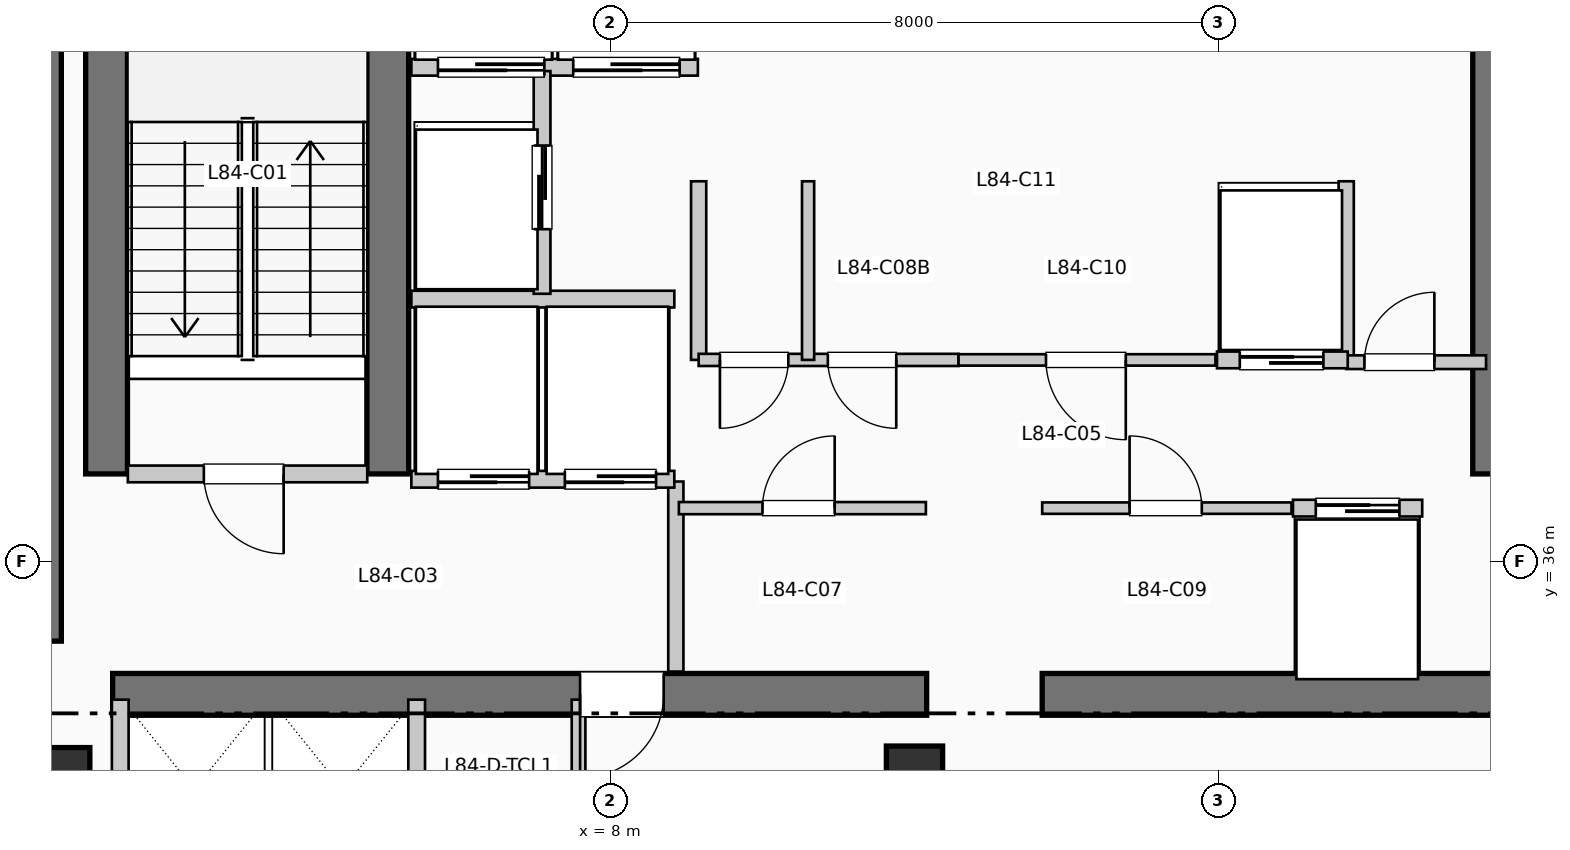
"""IFC4 building model, lengths in metres.
Left out: names, types, materials, properties, quantities, classifications, styles, units other than length and angle.
Written with IfcOpenShell. Run it as: python <this file> out.ifc"""

import sys

from ifc_helpers import new_model, si_unit, direction, frame, frame_2d, origin, origin_2d, place, context, subcontext, project, spatial, rectangle, extrude, element, fill, save


model = new_model("IFC4")
c1 = context("Model", 3, precision=1e-05, world=origin(), true_north=direction((0.0, 1.0)))
c2 = subcontext(c1, "Body", "Model", "MODEL_VIEW")
j1 = project(units=[si_unit("LENGTHUNIT", "METRE"), si_unit("PLANEANGLEUNIT", "RADIAN")], contexts=[c1])
p1 = place(None, origin())
s1 = spatial("IfcSite", under=j1, at=p1, CompositionType="ELEMENT")
p2 = place(p1, origin())
s2 = spatial("IfcBuilding", under=s1, at=p2, CompositionType="ELEMENT")
p3 = place(p2, frame((0.0, 0.0, 343.53)))
s3 = spatial("IfcBuildingStorey", under=s2, at=p3, CompositionType="ELEMENT", Elevation=343.53)
p4 = place(p3, frame((0.5, 34.95, 0.0), z_axis=(0.0, 0.0, 1.0), x_axis=(0.0, 1.0, 0.0)))
e1 = element("IfcWall", 1, at=p4, inside=s3, PredefinedType="SHEAR", context=c2, shape_type="SweptSolid", body=[
    extrude(rectangle(XDim=7.9, YDim=0.55, at=frame_2d((3.95, 0.0))), origin(), (0.0, 0.0, 1.0), 3.96),
])
p5 = place(p3, frame((1.45, 34.25, 0.0), z_axis=(0.0, 0.0, 1.0), x_axis=(1.0, 0.0, 0.0)))
e2 = element("IfcWall", 2, at=p5, inside=s3, PredefinedType="SHEAR", context=c2, shape_type="SweptSolid", body=[
    extrude(rectangle(XDim=10.71, YDim=0.55, at=frame_2d((5.355, 0.0))), origin(), (0.0, 0.0, 1.0), 3.96),
])
p6 = place(p5, frame((7.25, 0.0, 0.0), z_axis=(0.0, 0.0, 1.0), x_axis=(-1.0, 0.0, 0.0)))
e3 = element("IfcOpeningElement", 3, at=p6, cuts=e2, PredefinedType="OPENING", context=c2, shape_type="SweptSolid", body=[
    extrude(rectangle(XDim=1.1, YDim=2.15, at=frame_2d((0.55, 1.075))), frame((0.0, 0.285, 0.0), z_axis=(0.0, -1.0, 0.0), x_axis=(1.0, 0.0, 0.0)), (0.0, 0.0, 1.0), 0.57),
])
p7 = place(p3, frame((13.68, 34.25, 0.0), z_axis=(0.0, 0.0, 1.0), x_axis=(1.0, 0.0, 0.0)))
e4 = element("IfcWall", 4, at=p7, inside=s3, PredefinedType="SHEAR", context=c2, shape_type="SweptSolid", body=[
    extrude(rectangle(XDim=6.12, YDim=0.55, at=frame_2d((3.06, 0.0))), origin(), (0.0, 0.0, 1.0), 3.96),
])
for number, where, z_axis, x_axis in (
    (5, (1.37, 37.15, 0.0), (0.0, 0.0, 1.0), (0.0, 1.0, 0.0)),
    (6, (5.07, 37.15, 0.0), (0.0, 0.0, 1.0), (0.0, 1.0, 0.0)),
    (7, (19.62, 37.15, 0.0), (0.0, 0.0, 1.0), (0.0, 1.0, 0.0)),
):
    element("IfcWall", number, at=place(p3, frame(where, z_axis=z_axis, x_axis=x_axis)), inside=s3, PredefinedType="SHEAR", context=c2, shape_type="SweptSolid", body=[
        extrude(rectangle(XDim=7.89, YDim=0.55, at=frame_2d((3.945, 0.0))), origin(), (0.0, 0.0, 1.0), 3.96),
    ])
p8 = place(p3, frame((0.8, 33.2, 0.0), z_axis=(0.0, 0.0, 1.0), x_axis=(1.0, 0.0, 0.0)))
e8 = element("IfcColumn", 8, at=p8, inside=s3, PredefinedType="COLUMN", context=c2, shape_type="SweptSolid", body=[
    extrude(rectangle(XDim=0.7, YDim=0.7, at=origin_2d()), origin(), (0.0, 0.0, 1.0), 3.96),
])
p9 = place(p3, frame((12.0, 33.2, 0.0), z_axis=(0.0, 0.0, 1.0), x_axis=(1.0, 0.0, 0.0)))
e9 = element("IfcColumn", 9, at=p9, inside=s3, PredefinedType="COLUMN", context=c2, shape_type="SweptSolid", body=[
    extrude(rectangle(XDim=0.74, YDim=0.74, at=origin_2d()), origin(), (0.0, 0.0, 1.0), 3.96),
])
p10 = place(p3, frame((1.65, 37.15, 0.0), z_axis=(0.0, 0.0, 1.0), x_axis=(1.0, 0.0, 0.0)))
e10 = element("IfcWall", 10, at=p10, inside=s3, PredefinedType="PARTITIONING", context=c2, shape_type="SweptSolid", body=[
    extrude(rectangle(XDim=3.15, YDim=0.22, at=frame_2d((1.575, 0.0))), origin(), (0.0, 0.0, 1.0), 3.71),
])
p11 = place(p10, frame((2.05, 0.0, 0.0), z_axis=(0.0, 0.0, 1.0), x_axis=(-1.0, 0.0, 0.0)))
e11 = element("IfcOpeningElement", 11, at=p11, cuts=e10, PredefinedType="OPENING", context=c2, shape_type="SweptSolid", body=[
    extrude(rectangle(XDim=1.05, YDim=2.15, at=frame_2d((0.525, 1.075))), frame((0.0, 0.12, 0.0), z_axis=(0.0, -1.0, 0.0), x_axis=(1.0, 0.0, 0.0)), (0.0, 0.0, 1.0), 0.24),
])
p12 = place(p3, frame((8.86, 34.55, 0.0), z_axis=(0.0, 0.0, 1.0), x_axis=(0.0, 1.0, 0.0)))
e12 = element("IfcWall", 12, at=p12, inside=s3, PredefinedType="PARTITIONING", context=c2, shape_type="SweptSolid", body=[
    extrude(rectangle(XDim=2.5, YDim=0.2, at=frame_2d((1.25, 0.0))), origin(), (0.0, 0.0, 1.0), 3.71),
])
p13 = place(p3, frame((5.38, 37.08, 0.0), z_axis=(0.0, 0.0, 1.0), x_axis=(1.0, 0.0, 0.0)))
e13 = element("IfcWall", 13, at=p13, inside=s3, PredefinedType="PARTITIONING", context=c2, shape_type="SweptSolid", body=[
    extrude(rectangle(XDim=3.46, YDim=0.22, at=frame_2d((1.73, 0.0))), origin(), (0.0, 0.0, 1.0), 3.71),
])
p14 = place(p13, frame((1.55, 0.0, 0.0), z_axis=(0.0, 0.0, 1.0), x_axis=(-1.0, 0.0, 0.0)))
e14 = element("IfcOpeningElement", 14, at=p14, cuts=e13, PredefinedType="OPENING", context=c2, shape_type="SweptSolid", body=[
    extrude(rectangle(XDim=1.2, YDim=2.2, at=frame_2d((0.6, 1.1))), frame((0.0, 0.12, 0.0), z_axis=(0.0, -1.0, 0.0), x_axis=(1.0, 0.0, 0.0)), (0.0, 0.0, 1.0), 0.24),
])
p15 = place(p13, frame((3.22, 0.0, 0.0), z_axis=(0.0, 0.0, 1.0), x_axis=(-1.0, 0.0, 0.0)))
e15 = element("IfcOpeningElement", 15, at=p15, cuts=e13, PredefinedType="OPENING", context=c2, shape_type="SweptSolid", body=[
    extrude(rectangle(XDim=1.2, YDim=2.2, at=frame_2d((0.6, 1.1))), frame((0.0, 0.12, 0.0), z_axis=(0.0, -1.0, 0.0), x_axis=(1.0, 0.0, 0.0)), (0.0, 0.0, 1.0), 0.24),
])
p16 = place(p3, frame((5.38, 39.45, 0.0), z_axis=(0.0, 0.0, 1.0), x_axis=(1.0, 0.0, 0.0)))
e16 = element("IfcWall", 16, at=p16, inside=s3, PredefinedType="PARTITIONING", context=c2, shape_type="SweptSolid", body=[
    extrude(rectangle(XDim=3.46, YDim=0.22, at=frame_2d((1.73, 0.0))), origin(), (0.0, 0.0, 1.0), 3.71),
])
p17 = place(p3, frame((5.38, 42.5, 0.0), z_axis=(0.0, 0.0, 1.0), x_axis=(1.0, 0.0, 0.0)))
e17 = element("IfcWall", 17, at=p17, inside=s3, PredefinedType="PARTITIONING", context=c2, shape_type="SweptSolid", body=[
    extrude(rectangle(XDim=3.77, YDim=0.22, at=frame_2d((1.885, 0.0))), origin(), (0.0, 0.0, 1.0), 3.71),
])
p18 = place(p17, frame((1.75, 0.0, 0.0), z_axis=(0.0, 0.0, 1.0), x_axis=(-1.0, 0.0, 0.0)))
e18 = element("IfcOpeningElement", 18, at=p18, cuts=e17, PredefinedType="OPENING", context=c2, shape_type="SweptSolid", body=[
    extrude(rectangle(XDim=1.4, YDim=2.2, at=frame_2d((0.7, 1.1))), frame((0.0, 0.12, 0.0), z_axis=(0.0, -1.0, 0.0), x_axis=(1.0, 0.0, 0.0)), (0.0, 0.0, 1.0), 0.24),
])
p19 = place(p17, frame((3.53, 0.0, 0.0), z_axis=(0.0, 0.0, 1.0), x_axis=(-1.0, 0.0, 0.0)))
e19 = element("IfcOpeningElement", 19, at=p19, cuts=e17, PredefinedType="OPENING", context=c2, shape_type="SweptSolid", body=[
    extrude(rectangle(XDim=1.4, YDim=2.2, at=frame_2d((0.7, 1.1))), frame((0.0, 0.12, 0.0), z_axis=(0.0, -1.0, 0.0), x_axis=(1.0, 0.0, 0.0)), (0.0, 0.0, 1.0), 0.24),
])
p20 = place(p3, frame((7.1, 39.52, 0.0), z_axis=(0.0, 0.0, 1.0), x_axis=(0.0, 1.0, 0.0)))
e20 = element("IfcWall", 20, at=p20, inside=s3, PredefinedType="PARTITIONING", context=c2, shape_type="SweptSolid", body=[
    extrude(rectangle(XDim=2.93, YDim=0.22, at=frame_2d((1.465, 0.0))), origin(), (0.0, 0.0, 1.0), 3.71),
])
p21 = place(p20, frame((0.85, 0.0, 0.0)))
e21 = element("IfcOpeningElement", 21, at=p21, cuts=e20, PredefinedType="OPENING", context=c2, shape_type="SweptSolid", body=[
    extrude(rectangle(XDim=1.1, YDim=2.2, at=frame_2d((0.55, 1.1))), frame((0.0, 0.12, 0.0), z_axis=(0.0, -1.0, 0.0), x_axis=(1.0, 0.0, 0.0)), (0.0, 0.0, 1.0), 0.24),
])
for number, where, z_axis, x_axis in (
    (22, (1.55, 31.8, 0.0), (0.0, 0.0, 1.0), (0.0, 1.0, 0.0)),
    (23, (5.45, 31.8, 0.0), (0.0, 0.0, 1.0), (0.0, 1.0, 0.0)),
):
    element("IfcWall", number, at=place(p3, frame(where, z_axis=z_axis, x_axis=x_axis)), inside=s3, PredefinedType="PARTITIONING", context=c2, shape_type="SweptSolid", body=[
        extrude(rectangle(XDim=2.38, YDim=0.22, at=frame_2d((1.19, 0.0))), origin(), (0.0, 0.0, 1.0), 3.71),
    ])
for number, where, z_axis, x_axis in (
    (24, (9.16, 38.65, 0.0), (0.0, 0.0, 1.0), (0.0, 1.0, 0.0)),
    (25, (17.68, 38.65, 0.0), (0.0, 0.0, 1.0), (0.0, 1.0, 0.0)),
):
    element("IfcWall", number, at=place(p3, frame(where, z_axis=z_axis, x_axis=x_axis)), inside=s3, PredefinedType="PARTITIONING", context=c2, shape_type="SweptSolid", body=[
        extrude(rectangle(XDim=2.35, YDim=0.2, at=frame_2d((1.175, 0.0))), origin(), (0.0, 0.0, 1.0), 3.71),
    ])
p22 = place(p3, frame((17.68, 38.62, 0.0), z_axis=(0.0, 0.0, 1.0), x_axis=(1.0, 0.0, 0.0)))
e26 = element("IfcWall", 26, at=p22, inside=s3, PredefinedType="PARTITIONING", context=c2, shape_type="SweptSolid", body=[
    extrude(rectangle(XDim=1.84, YDim=0.18, at=frame_2d((0.92, 0.0))), origin(), (0.0, 0.0, 1.0), 3.71),
])
p23 = place(p22, frame((0.24, 0.0, 0.0)))
e27 = element("IfcOpeningElement", 27, at=p23, cuts=e26, PredefinedType="OPENING", context=c2, shape_type="SweptSolid", body=[
    extrude(rectangle(XDim=0.92, YDim=2.1, at=frame_2d((0.46, 1.05))), frame((0.0, 0.1, 0.0), z_axis=(0.0, -1.0, 0.0), x_axis=(1.0, 0.0, 0.0)), (0.0, 0.0, 1.0), 0.2),
])
p24 = place(p3, frame((7.58, 31.82, 0.0), z_axis=(0.0, 0.0, 1.0), x_axis=(0.0, 1.0, 0.0)))
e28 = element("IfcWall", 28, at=p24, inside=s3, PredefinedType="PLUMBINGWALL", context=c2, shape_type="SweptSolid", body=[
    extrude(rectangle(XDim=2.36, YDim=0.18, at=frame_2d((1.18, 0.0))), origin(), (0.0, 0.0, 1.0), 3.71),
])
p25 = place(p3, frame((8.9, 36.7, 0.0), z_axis=(0.0, 0.0, 1.0), x_axis=(1.0, 0.0, 0.0)))
e29 = element("IfcWall", 29, at=p25, inside=s3, PredefinedType="PARTITIONING", context=c2, shape_type="SweptSolid", body=[
    extrude(rectangle(XDim=3.25, YDim=0.16, at=frame_2d((1.625, 0.0))), origin(), (0.0, 0.0, 1.0), 3.71),
])
p26 = place(p25, frame((1.1, 0.0, 0.0)))
e30 = element("IfcOpeningElement", 30, at=p26, cuts=e29, PredefinedType="OPENING", context=c2, shape_type="SweptSolid", body=[
    extrude(rectangle(XDim=0.95, YDim=2.15, at=frame_2d((0.475, 1.075))), frame((0.0, 0.09, 0.0), z_axis=(0.0, -1.0, 0.0), x_axis=(1.0, 0.0, 0.0)), (0.0, 0.0, 1.0), 0.18),
])
p27 = place(p3, frame((9.16, 38.65, 0.0), z_axis=(0.0, 0.0, 1.0), x_axis=(1.0, 0.0, 0.0)))
e31 = element("IfcWall", 31, at=p27, inside=s3, PredefinedType="PARTITIONING", context=c2, shape_type="SweptSolid", body=[
    extrude(rectangle(XDim=3.42, YDim=0.16, at=frame_2d((1.71, 0.0))), origin(), (0.0, 0.0, 1.0), 3.71),
])
p28 = place(p27, frame((1.18, 0.0, 0.0), z_axis=(0.0, 0.0, 1.0), x_axis=(-1.0, 0.0, 0.0)))
e32 = element("IfcOpeningElement", 32, at=p28, cuts=e31, PredefinedType="OPENING", context=c2, shape_type="SweptSolid", body=[
    extrude(rectangle(XDim=0.9, YDim=2.15, at=frame_2d((0.45, 1.075))), frame((0.0, 0.09, 0.0), z_axis=(0.0, -1.0, 0.0), x_axis=(1.0, 0.0, 0.0)), (0.0, 0.0, 1.0), 0.18),
])
p29 = place(p27, frame((2.6, 0.0, 0.0), z_axis=(0.0, 0.0, 1.0), x_axis=(-1.0, 0.0, 0.0)))
e33 = element("IfcOpeningElement", 33, at=p29, cuts=e31, PredefinedType="OPENING", context=c2, shape_type="SweptSolid", body=[
    extrude(rectangle(XDim=0.9, YDim=2.15, at=frame_2d((0.45, 1.075))), frame((0.0, 0.09, 0.0), z_axis=(0.0, -1.0, 0.0), x_axis=(1.0, 0.0, 0.0)), (0.0, 0.0, 1.0), 0.18),
])
p30 = place(p3, frame((10.6, 38.65, 0.0), z_axis=(0.0, 0.0, 1.0), x_axis=(0.0, 1.0, 0.0)))
e34 = element("IfcWall", 34, at=p30, inside=s3, PredefinedType="PARTITIONING", context=c2, shape_type="SweptSolid", body=[
    extrude(rectangle(XDim=2.35, YDim=0.16, at=frame_2d((1.175, 0.0))), origin(), (0.0, 0.0, 1.0), 3.71),
])
p31 = place(p3, frame((13.68, 36.7, 0.0), z_axis=(0.0, 0.0, 1.0), x_axis=(1.0, 0.0, 0.0)))
e35 = element("IfcWall", 35, at=p31, inside=s3, PredefinedType="PARTITIONING", context=c2, shape_type="SweptSolid", body=[
    extrude(rectangle(XDim=3.28, YDim=0.15, at=frame_2d((1.64, 0.0))), origin(), (0.0, 0.0, 1.0), 3.71),
])
p32 = place(p31, frame((1.15, 0.0, 0.0)))
e36 = element("IfcOpeningElement", 36, at=p32, cuts=e35, PredefinedType="OPENING", context=c2, shape_type="SweptSolid", body=[
    extrude(rectangle(XDim=0.95, YDim=2.15, at=frame_2d((0.475, 1.075))), frame((0.0, 0.085, 0.0), z_axis=(0.0, -1.0, 0.0), x_axis=(1.0, 0.0, 0.0)), (0.0, 0.0, 1.0), 0.17),
])
p33 = place(p3, frame((12.58, 38.65, 0.0), z_axis=(0.0, 0.0, 1.0), x_axis=(1.0, 0.0, 0.0)))
e37 = element("IfcWall", 37, at=p33, inside=s3, PredefinedType="PARTITIONING", context=c2, shape_type="SweptSolid", body=[
    extrude(rectangle(XDim=3.38, YDim=0.15, at=frame_2d((1.69, 0.0))), origin(), (0.0, 0.0, 1.0), 3.71),
])
p34 = place(p33, frame((2.2, 0.0, 0.0), z_axis=(0.0, 0.0, 1.0), x_axis=(-1.0, 0.0, 0.0)))
e38 = element("IfcOpeningElement", 38, at=p34, cuts=e37, PredefinedType="OPENING", context=c2, shape_type="SweptSolid", body=[
    extrude(rectangle(XDim=1.05, YDim=2.15, at=frame_2d((0.525, 1.075))), frame((0.0, 0.085, 0.0), z_axis=(0.0, -1.0, 0.0), x_axis=(1.0, 0.0, 0.0)), (0.0, 0.0, 1.0), 0.17),
])
p35 = place(p3, frame((16.98, 36.7, 0.0), z_axis=(0.0, 0.0, 1.0), x_axis=(1.0, 0.0, 0.0)))
e39 = element("IfcWall", 39, at=p35, inside=s3, PredefinedType="PARTITIONING", context=c2, shape_type="SweptSolid", body=[
    extrude(rectangle(XDim=1.7, YDim=0.22, at=frame_2d((0.85, 0.0))), origin(), (0.0, 0.0, 1.0), 3.71),
])
p36 = place(p35, frame((0.3, 0.0, 0.0)))
e40 = element("IfcOpeningElement", 40, at=p36, cuts=e39, PredefinedType="OPENING", context=c2, shape_type="SweptSolid", body=[
    extrude(rectangle(XDim=1.1, YDim=2.2, at=frame_2d((0.55, 1.1))), frame((0.0, 0.12, 0.0), z_axis=(0.0, -1.0, 0.0), x_axis=(1.0, 0.0, 0.0)), (0.0, 0.0, 1.0), 0.24),
])
p37 = place(p3, frame((15.98, 38.65, 0.0), z_axis=(0.0, 0.0, 1.0), x_axis=(1.0, 0.0, 0.0)))
e41 = element("IfcWall", 41, at=p37, inside=s3, PredefinedType="PARTITIONING", context=c2, shape_type="SweptSolid", body=[
    extrude(rectangle(XDim=1.72, YDim=0.22, at=frame_2d((0.86, 0.0))), origin(), (0.0, 0.0, 1.0), 3.71),
])
p38 = place(p37, frame((0.3, 0.0, 0.0)))
e42 = element("IfcOpeningElement", 42, at=p38, cuts=e41, PredefinedType="OPENING", context=c2, shape_type="SweptSolid", body=[
    extrude(rectangle(XDim=1.1, YDim=2.2, at=frame_2d((0.55, 1.1))), frame((0.0, 0.12, 0.0), z_axis=(0.0, -1.0, 0.0), x_axis=(1.0, 0.0, 0.0)), (0.0, 0.0, 1.0), 0.24),
])
p39 = place(p11, origin())
e43 = element("IfcDoor", 43, at=p39, inside=s3, OperationType="SINGLE_SWING_RIGHT", PredefinedType="DOOR", context=c2, shape_type="SweptSolid", body=[
    extrude(rectangle(XDim=1.05, YDim=2.15, at=frame_2d((0.525, 1.075))), frame((0.0, 0.025, 0.0), z_axis=(0.0, -1.0, 0.0), x_axis=(1.0, 0.0, 0.0)), (0.0, 0.0, 1.0), 0.05),
])
fill(e11, e43)
p40 = place(p6, origin())
e44 = element("IfcDoor", 44, at=p40, inside=s3, OperationType="SINGLE_SWING_LEFT", PredefinedType="DOOR", context=c2, shape_type="SweptSolid", body=[
    extrude(rectangle(XDim=1.1, YDim=2.15, at=frame_2d((0.55, 1.075))), frame((0.0, 0.025, 0.0), z_axis=(0.0, -1.0, 0.0), x_axis=(1.0, 0.0, 0.0)), (0.0, 0.0, 1.0), 0.05),
])
fill(e3, e44)
p41 = place(p14, origin())
e45 = element("IfcDoor", 45, at=p41, inside=s3, OperationType="SLIDING_TO_RIGHT", PredefinedType="DOOR", context=c2, shape_type="SweptSolid", body=[
    extrude(rectangle(XDim=1.2, YDim=2.2, at=frame_2d((0.6, 1.1))), frame((0.0, 0.025, 0.0), z_axis=(0.0, -1.0, 0.0), x_axis=(1.0, 0.0, 0.0)), (0.0, 0.0, 1.0), 0.05),
])
fill(e14, e45)
p42 = place(p15, origin())
e46 = element("IfcDoor", 46, at=p42, inside=s3, OperationType="SLIDING_TO_RIGHT", PredefinedType="DOOR", context=c2, shape_type="SweptSolid", body=[
    extrude(rectangle(XDim=1.2, YDim=2.2, at=frame_2d((0.6, 1.1))), frame((0.0, 0.025, 0.0), z_axis=(0.0, -1.0, 0.0), x_axis=(1.0, 0.0, 0.0)), (0.0, 0.0, 1.0), 0.05),
])
fill(e15, e46)
p43 = place(p18, origin())
e47 = element("IfcDoor", 47, at=p43, inside=s3, OperationType="SLIDING_TO_LEFT", PredefinedType="DOOR", context=c2, shape_type="SweptSolid", body=[
    extrude(rectangle(XDim=1.4, YDim=2.2, at=frame_2d((0.7, 1.1))), frame((0.0, 0.025, 0.0), z_axis=(0.0, -1.0, 0.0), x_axis=(1.0, 0.0, 0.0)), (0.0, 0.0, 1.0), 0.05),
])
fill(e18, e47)
p44 = place(p19, origin())
e48 = element("IfcDoor", 48, at=p44, inside=s3, OperationType="SLIDING_TO_LEFT", PredefinedType="DOOR", context=c2, shape_type="SweptSolid", body=[
    extrude(rectangle(XDim=1.4, YDim=2.2, at=frame_2d((0.7, 1.1))), frame((0.0, 0.025, 0.0), z_axis=(0.0, -1.0, 0.0), x_axis=(1.0, 0.0, 0.0)), (0.0, 0.0, 1.0), 0.05),
])
fill(e19, e48)
p45 = place(p21, origin())
e49 = element("IfcDoor", 49, at=p45, inside=s3, OperationType="SLIDING_TO_LEFT", PredefinedType="DOOR", context=c2, shape_type="SweptSolid", body=[
    extrude(rectangle(XDim=1.1, YDim=2.2, at=frame_2d((0.55, 1.1))), frame((0.0, 0.025, 0.0), z_axis=(0.0, -1.0, 0.0), x_axis=(1.0, 0.0, 0.0)), (0.0, 0.0, 1.0), 0.05),
])
fill(e21, e49)
p46 = place(p23, origin())
e50 = element("IfcDoor", 50, at=p46, inside=s3, OperationType="SINGLE_SWING_RIGHT", PredefinedType="DOOR", context=c2, shape_type="SweptSolid", body=[
    extrude(rectangle(XDim=0.92, YDim=2.1, at=frame_2d((0.46, 1.05))), frame((0.0, 0.025, 0.0), z_axis=(0.0, -1.0, 0.0), x_axis=(1.0, 0.0, 0.0)), (0.0, 0.0, 1.0), 0.05),
])
fill(e27, e50)
p47 = place(p26, origin())
e51 = element("IfcDoor", 51, at=p47, inside=s3, OperationType="SINGLE_SWING_RIGHT", PredefinedType="DOOR", context=c2, shape_type="SweptSolid", body=[
    extrude(rectangle(XDim=0.95, YDim=2.15, at=frame_2d((0.475, 1.075))), frame((0.0, 0.025, 0.0), z_axis=(0.0, -1.0, 0.0), x_axis=(1.0, 0.0, 0.0)), (0.0, 0.0, 1.0), 0.05),
])
fill(e30, e51)
p48 = place(p28, origin())
e52 = element("IfcDoor", 52, at=p48, inside=s3, OperationType="SINGLE_SWING_LEFT", PredefinedType="DOOR", context=c2, shape_type="SweptSolid", body=[
    extrude(rectangle(XDim=0.9, YDim=2.15, at=frame_2d((0.45, 1.075))), frame((0.0, 0.025, 0.0), z_axis=(0.0, -1.0, 0.0), x_axis=(1.0, 0.0, 0.0)), (0.0, 0.0, 1.0), 0.05),
])
fill(e32, e52)
p49 = place(p29, origin())
e53 = element("IfcDoor", 53, at=p49, inside=s3, OperationType="SINGLE_SWING_RIGHT", PredefinedType="DOOR", context=c2, shape_type="SweptSolid", body=[
    extrude(rectangle(XDim=0.9, YDim=2.15, at=frame_2d((0.45, 1.075))), frame((0.0, 0.025, 0.0), z_axis=(0.0, -1.0, 0.0), x_axis=(1.0, 0.0, 0.0)), (0.0, 0.0, 1.0), 0.05),
])
fill(e33, e53)
p50 = place(p32, origin())
e54 = element("IfcDoor", 54, at=p50, inside=s3, OperationType="SINGLE_SWING_LEFT", PredefinedType="DOOR", context=c2, shape_type="SweptSolid", body=[
    extrude(rectangle(XDim=0.95, YDim=2.15, at=frame_2d((0.475, 1.075))), frame((0.0, 0.025, 0.0), z_axis=(0.0, -1.0, 0.0), x_axis=(1.0, 0.0, 0.0)), (0.0, 0.0, 1.0), 0.05),
])
fill(e36, e54)
p51 = place(p34, origin())
e55 = element("IfcDoor", 55, at=p51, inside=s3, OperationType="SINGLE_SWING_RIGHT", PredefinedType="DOOR", context=c2, shape_type="SweptSolid", body=[
    extrude(rectangle(XDim=1.05, YDim=2.15, at=frame_2d((0.525, 1.075))), frame((0.0, 0.025, 0.0), z_axis=(0.0, -1.0, 0.0), x_axis=(1.0, 0.0, 0.0)), (0.0, 0.0, 1.0), 0.05),
])
fill(e38, e55)
p52 = place(p36, origin())
e56 = element("IfcDoor", 56, at=p52, inside=s3, OperationType="SLIDING_TO_LEFT", PredefinedType="DOOR", context=c2, shape_type="SweptSolid", body=[
    extrude(rectangle(XDim=1.1, YDim=2.2, at=frame_2d((0.55, 1.1))), frame((0.0, 0.025, 0.0), z_axis=(0.0, -1.0, 0.0), x_axis=(1.0, 0.0, 0.0)), (0.0, 0.0, 1.0), 0.05),
])
fill(e40, e56)
p53 = place(p38, origin())
e57 = element("IfcDoor", 57, at=p53, inside=s3, OperationType="SLIDING_TO_LEFT", PredefinedType="DOOR", context=c2, shape_type="SweptSolid", body=[
    extrude(rectangle(XDim=1.1, YDim=2.2, at=frame_2d((0.55, 1.1))), frame((0.0, 0.025, 0.0), z_axis=(0.0, -1.0, 0.0), x_axis=(1.0, 0.0, 0.0)), (0.0, 0.0, 1.0), 0.05),
])
fill(e42, e57)
save(model, sys.argv[1])
